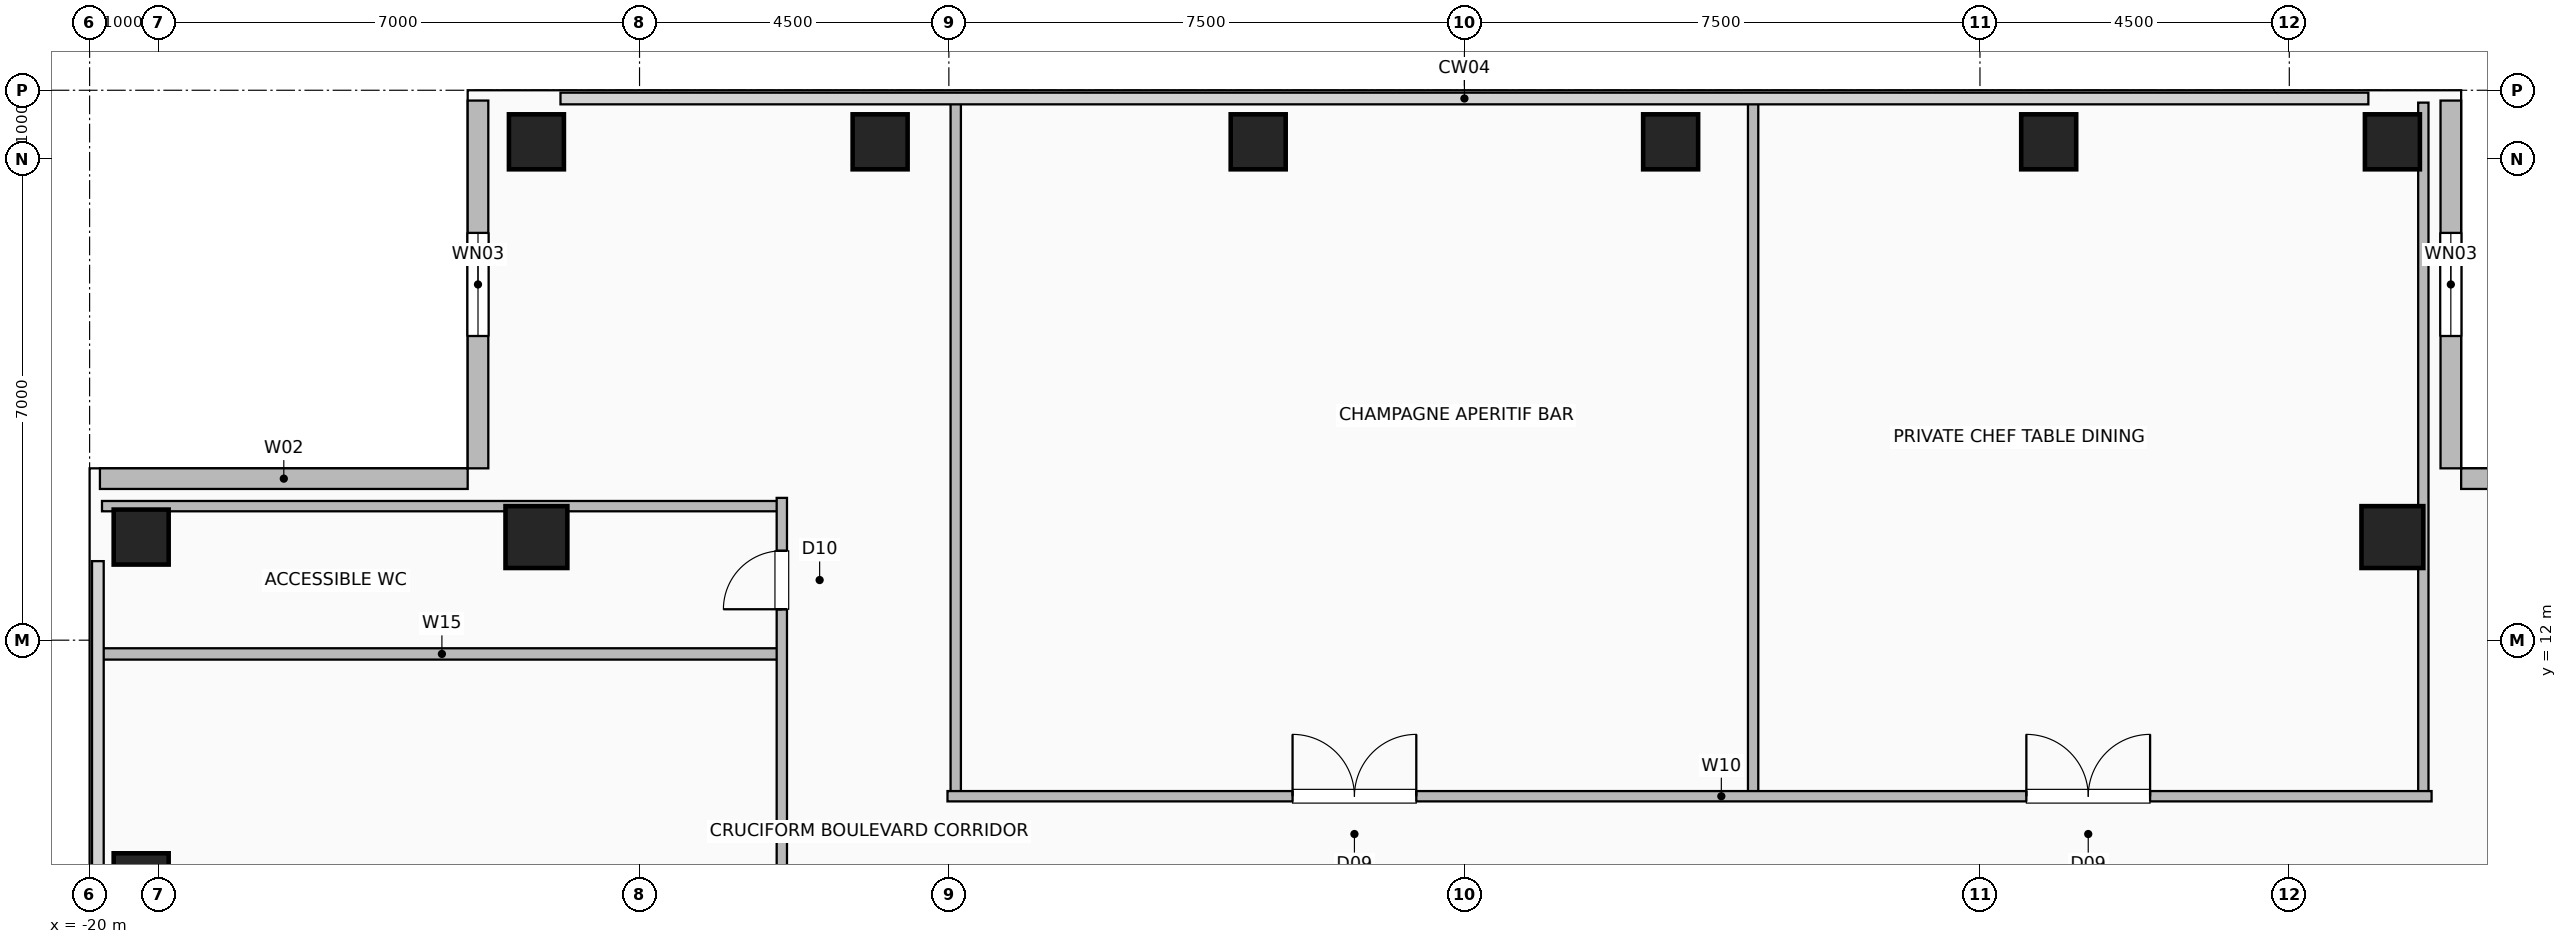
"""IFC4 building model, lengths in metres.
Left out: names, types, materials, properties, quantities, classifications, styles, units other than length and angle.
Written with IfcOpenShell. Run it as: python <this file> out.ifc"""

import sys

from ifc_helpers import new_model, si_unit, direction, frame, frame_2d, origin, origin_2d, place, context, subcontext, project, spatial, rectangle, hollow_rectangle, extrude, element, fill, save


model = new_model("IFC4")
c1 = context("Model", 3, precision=1e-05, world=origin(), true_north=direction((0.0, 1.0)))
c2 = subcontext(c1, "Body", "Model", "MODEL_VIEW")
j1 = project(units=[si_unit("LENGTHUNIT", "METRE"), si_unit("PLANEANGLEUNIT", "RADIAN")], contexts=[c1])
p1 = place(None, origin())
s1 = spatial("IfcSite", under=j1, at=p1, CompositionType="ELEMENT")
p2 = place(p1, origin())
s2 = spatial("IfcBuilding", under=s1, at=p2, CompositionType="ELEMENT")
p3 = place(p2, frame((0.0, 0.0, 198.6)))
s3 = spatial("IfcBuildingStorey", under=s2, at=p3, CompositionType="ELEMENT", Elevation=198.6)
for number, where, z_axis, x_axis in (
    (1, (-13.5, 19.25, 0.0), (0.0, 0.0, 1.0), (1.0, 0.0, 0.0)),
    (2, (-8.5, 19.25, 0.0), (0.0, 0.0, 1.0), (1.0, 0.0, 0.0)),
    (3, (-3.0, 19.25, 0.0), (0.0, 0.0, 1.0), (1.0, 0.0, 0.0)),
    (4, (3.0, 19.25, 0.0), (0.0, 0.0, 1.0), (1.0, 0.0, 0.0)),
    (5, (8.5, 19.25, 0.0), (0.0, 0.0, 1.0), (1.0, 0.0, 0.0)),
    (6, (-19.25, 8.5, 0.0), (0.0, 0.0, 1.0), (1.0, 0.0, 0.0)),
    (7, (13.5, 19.25, 0.0), (0.0, 0.0, 1.0), (1.0, 0.0, 0.0)),
    (8, (-19.25, 13.5, 0.0), (0.0, 0.0, 1.0), (1.0, 0.0, 0.0)),
):
    element("IfcColumn", number, at=place(p3, frame(where, z_axis=z_axis, x_axis=x_axis)), inside=s3, PredefinedType="COLUMN", context=c2, shape_type="SweptSolid", body=[
        extrude(hollow_rectangle(XDim=0.8, YDim=0.8, WallThickness=0.04, at=origin_2d()), origin(), (0.0, 0.0, 1.0), 3.6),
    ])
for number, where, z_axis, x_axis in (
    (9, (13.5, 13.5, 0.0), (0.0, 0.0, 1.0), (1.0, 0.0, 0.0)),
    (10, (-13.5, 13.5, 0.0), (0.0, 0.0, 1.0), (1.0, 0.0, 0.0)),
):
    element("IfcColumn", number, at=place(p3, frame(where, z_axis=z_axis, x_axis=x_axis)), inside=s3, PredefinedType="COLUMN", context=c2, shape_type="SweptSolid", body=[
        extrude(hollow_rectangle(XDim=0.9, YDim=0.9, WallThickness=0.045, at=origin_2d()), origin(), (0.0, 0.0, 1.0), 3.6),
    ])
p4 = place(p3, frame((14.35, 19.85, 0.0), z_axis=(0.0, 0.0, 1.0), x_axis=(0.0, -1.0, 0.0)))
e11 = element("IfcWall", 11, at=p4, inside=s3, PredefinedType="SOLIDWALL", context=c2, shape_type="SweptSolid", body=[
    extrude(rectangle(XDim=5.35, YDim=0.3, at=frame_2d((2.675, 0.0))), origin(), (0.0, 0.0, 1.0), 3.36),
])
p5 = place(p4, frame((1.925, 0.0, 0.9)))
e12 = element("IfcOpeningElement", 12, at=p5, cuts=e11, PredefinedType="OPENING", context=c2, shape_type="SweptSolid", body=[
    extrude(rectangle(XDim=1.5, YDim=1.8, at=frame_2d((0.75, 0.9))), frame((0.0, 0.16, 0.0), z_axis=(0.0, -1.0, 0.0), x_axis=(1.0, 0.0, 0.0)), (0.0, 0.0, 1.0), 0.32),
])
p6 = place(p3, frame((19.85, 14.35, 0.0), z_axis=(0.0, 0.0, 1.0), x_axis=(-1.0, 0.0, 0.0)))
e13 = element("IfcWall", 13, at=p6, inside=s3, PredefinedType="SOLIDWALL", context=c2, shape_type="SweptSolid", body=[
    extrude(rectangle(XDim=5.35, YDim=0.3, at=frame_2d((2.675, 0.0))), origin(), (0.0, 0.0, 1.0), 3.36),
])
p7 = place(p3, frame((-14.35, 19.85, 0.0), z_axis=(0.0, 0.0, 1.0), x_axis=(0.0, -1.0, 0.0)))
e14 = element("IfcWall", 14, at=p7, inside=s3, PredefinedType="SOLIDWALL", context=c2, shape_type="SweptSolid", body=[
    extrude(rectangle(XDim=5.35, YDim=0.3, at=frame_2d((2.675, 0.0))), origin(), (0.0, 0.0, 1.0), 3.36),
])
p8 = place(p7, frame((1.925, 0.0, 0.9)))
e15 = element("IfcOpeningElement", 15, at=p8, cuts=e14, PredefinedType="OPENING", context=c2, shape_type="SweptSolid", body=[
    extrude(rectangle(XDim=1.5, YDim=1.8, at=frame_2d((0.75, 0.9))), frame((0.0, 0.16, 0.0), z_axis=(0.0, -1.0, 0.0), x_axis=(1.0, 0.0, 0.0)), (0.0, 0.0, 1.0), 0.32),
])
p9 = place(p3, frame((-19.85, 14.35, 0.0), z_axis=(0.0, 0.0, 1.0), x_axis=(1.0, 0.0, 0.0)))
e16 = element("IfcWall", 16, at=p9, inside=s3, PredefinedType="SOLIDWALL", context=c2, shape_type="SweptSolid", body=[
    extrude(rectangle(XDim=5.35, YDim=0.3, at=frame_2d((2.675, 0.0))), origin(), (0.0, 0.0, 1.0), 3.36),
])
p10 = place(p3, frame((-19.82, 11.8, 0.0), z_axis=(0.0, 0.0, 1.0), x_axis=(1.0, 0.0, 0.0)))
e17 = element("IfcWall", 17, at=p10, inside=s3, PredefinedType="PLUMBINGWALL", context=c2, shape_type="SweptSolid", body=[
    extrude(rectangle(XDim=9.89, YDim=0.165, at=frame_2d((4.945, 0.0))), origin(), (0.0, 0.0, 1.0), 3.36),
])
p11 = place(p3, frame((-19.82, 13.95, 0.0), z_axis=(0.0, 0.0, 1.0), x_axis=(1.0, 0.0, 0.0)))
e18 = element("IfcWall", 18, at=p11, inside=s3, PredefinedType="PARTITIONING", context=c2, shape_type="SweptSolid", body=[
    extrude(rectangle(XDim=9.89, YDim=0.15, at=frame_2d((4.945, 0.0))), origin(), (0.0, 0.0, 1.0), 3.36),
])
p12 = place(p3, frame((-9.93, -7.52, 0.0), z_axis=(0.0, 0.0, 1.0), x_axis=(0.0, 1.0, 0.0)))
e19 = element("IfcWall", 19, at=p12, inside=s3, PredefinedType="PARTITIONING", context=c2, shape_type="SweptSolid", body=[
    extrude(rectangle(XDim=21.59, YDim=0.15, at=frame_2d((10.795, 0.0))), origin(), (0.0, 0.0, 1.0), 3.36),
])
p13 = place(p12, frame((8.82, 0.0, 0.0)))
e20 = element("IfcOpeningElement", 20, at=p13, cuts=e19, PredefinedType="OPENING", context=c2, shape_type="SweptSolid", body=[
    extrude(rectangle(XDim=1.8, YDim=2.08, at=frame_2d((0.9, 1.04))), frame((0.0, 0.085, 0.0), z_axis=(0.0, -1.0, 0.0), x_axis=(1.0, 0.0, 0.0)), (0.0, 0.0, 1.0), 0.17),
])
p14 = place(p12, frame((19.97, 0.0, 0.0)))
e21 = element("IfcOpeningElement", 21, at=p14, cuts=e19, PredefinedType="OPENING", context=c2, shape_type="SweptSolid", body=[
    extrude(rectangle(XDim=0.85, YDim=2.05, at=frame_2d((0.425, 1.025))), frame((0.0, 0.085, 0.0), z_axis=(0.0, -1.0, 0.0), x_axis=(1.0, 0.0, 0.0)), (0.0, 0.0, 1.0), 0.17),
])
for number, where, z_axis, x_axis in (
    (22, (-7.4, 9.73, 0.0), (0.0, 0.0, 1.0), (0.0, 1.0, 0.0)),
    (23, (4.2, 9.73, 0.0), (0.0, 0.0, 1.0), (0.0, 1.0, 0.0)),
    (24, (13.95, 9.73, 0.0), (0.0, 0.0, 1.0), (0.0, 1.0, 0.0)),
):
    element("IfcWall", number, at=place(p3, frame(where, z_axis=z_axis, x_axis=x_axis)), inside=s3, PredefinedType="PARTITIONING", context=c2, shape_type="SweptSolid", body=[
        extrude(rectangle(XDim=10.09, YDim=0.15, at=frame_2d((5.045, 0.0))), origin(), (0.0, 0.0, 1.0), 3.36),
    ])
p15 = place(p3, frame((-7.52, 9.73, 0.0), z_axis=(0.0, 0.0, 1.0), x_axis=(1.0, 0.0, 0.0)))
e25 = element("IfcWall", 25, at=p15, inside=s3, PredefinedType="PARTITIONING", context=c2, shape_type="SweptSolid", body=[
    extrude(rectangle(XDim=21.59, YDim=0.15, at=frame_2d((10.795, 0.0))), origin(), (0.0, 0.0, 1.0), 3.36),
])
p16 = place(p15, frame((5.02, 0.0, 0.0)))
e26 = element("IfcOpeningElement", 26, at=p16, cuts=e25, PredefinedType="OPENING", context=c2, shape_type="SweptSolid", body=[
    extrude(rectangle(XDim=1.8, YDim=2.08, at=frame_2d((0.9, 1.04))), frame((0.0, 0.085, 0.0), z_axis=(0.0, -1.0, 0.0), x_axis=(1.0, 0.0, 0.0)), (0.0, 0.0, 1.0), 0.17),
])
p17 = place(p15, frame((15.695, 0.0, 0.0)))
e27 = element("IfcOpeningElement", 27, at=p17, cuts=e25, PredefinedType="OPENING", context=c2, shape_type="SweptSolid", body=[
    extrude(rectangle(XDim=1.8, YDim=2.08, at=frame_2d((0.9, 1.04))), frame((0.0, 0.085, 0.0), z_axis=(0.0, -1.0, 0.0), x_axis=(1.0, 0.0, 0.0)), (0.0, 0.0, 1.0), 0.17),
])
p18 = place(p5, origin())
e28 = element("IfcWindow", 28, at=p18, inside=s3, PartitioningType="SINGLE_PANEL", PredefinedType="WINDOW", context=c2, shape_type="SweptSolid", body=[
    extrude(rectangle(XDim=1.5, YDim=1.8, at=frame_2d((0.75, 0.9))), frame((0.0, 0.03, 0.0), z_axis=(0.0, -1.0, 0.0), x_axis=(1.0, 0.0, 0.0)), (0.0, 0.0, 1.0), 0.06),
])
fill(e12, e28)
p19 = place(p8, origin())
e29 = element("IfcWindow", 29, at=p19, inside=s3, PartitioningType="SINGLE_PANEL", PredefinedType="WINDOW", context=c2, shape_type="SweptSolid", body=[
    extrude(rectangle(XDim=1.5, YDim=1.8, at=frame_2d((0.75, 0.9))), frame((0.0, 0.03, 0.0), z_axis=(0.0, -1.0, 0.0), x_axis=(1.0, 0.0, 0.0)), (0.0, 0.0, 1.0), 0.06),
])
fill(e15, e29)
p20 = place(p14, origin())
e30 = element("IfcDoor", 30, at=p20, inside=s3, OperationType="SINGLE_SWING_LEFT", PredefinedType="DOOR", context=c2, shape_type="SweptSolid", body=[
    extrude(rectangle(XDim=0.85, YDim=2.05, at=frame_2d((0.425, 1.025))), frame((0.0, 0.025, 0.0), z_axis=(0.0, -1.0, 0.0), x_axis=(1.0, 0.0, 0.0)), (0.0, 0.0, 1.0), 0.05),
])
fill(e21, e30)
p21 = place(p16, origin())
e31 = element("IfcDoor", 31, at=p21, inside=s3, OperationType="DOUBLE_DOOR_SINGLE_SWING", PredefinedType="DOOR", context=c2, shape_type="SweptSolid", body=[
    extrude(rectangle(XDim=1.8, YDim=2.08, at=frame_2d((0.9, 1.04))), frame((0.0, 0.025, 0.0), z_axis=(0.0, -1.0, 0.0), x_axis=(1.0, 0.0, 0.0)), (0.0, 0.0, 1.0), 0.05),
])
fill(e26, e31)
p22 = place(p17, origin())
e32 = element("IfcDoor", 32, at=p22, inside=s3, OperationType="DOUBLE_DOOR_SINGLE_SWING", PredefinedType="DOOR", context=c2, shape_type="SweptSolid", body=[
    extrude(rectangle(XDim=1.8, YDim=2.08, at=frame_2d((0.9, 1.04))), frame((0.0, 0.025, 0.0), z_axis=(0.0, -1.0, 0.0), x_axis=(1.0, 0.0, 0.0)), (0.0, 0.0, 1.0), 0.05),
])
fill(e27, e32)
save(model, sys.argv[1])
